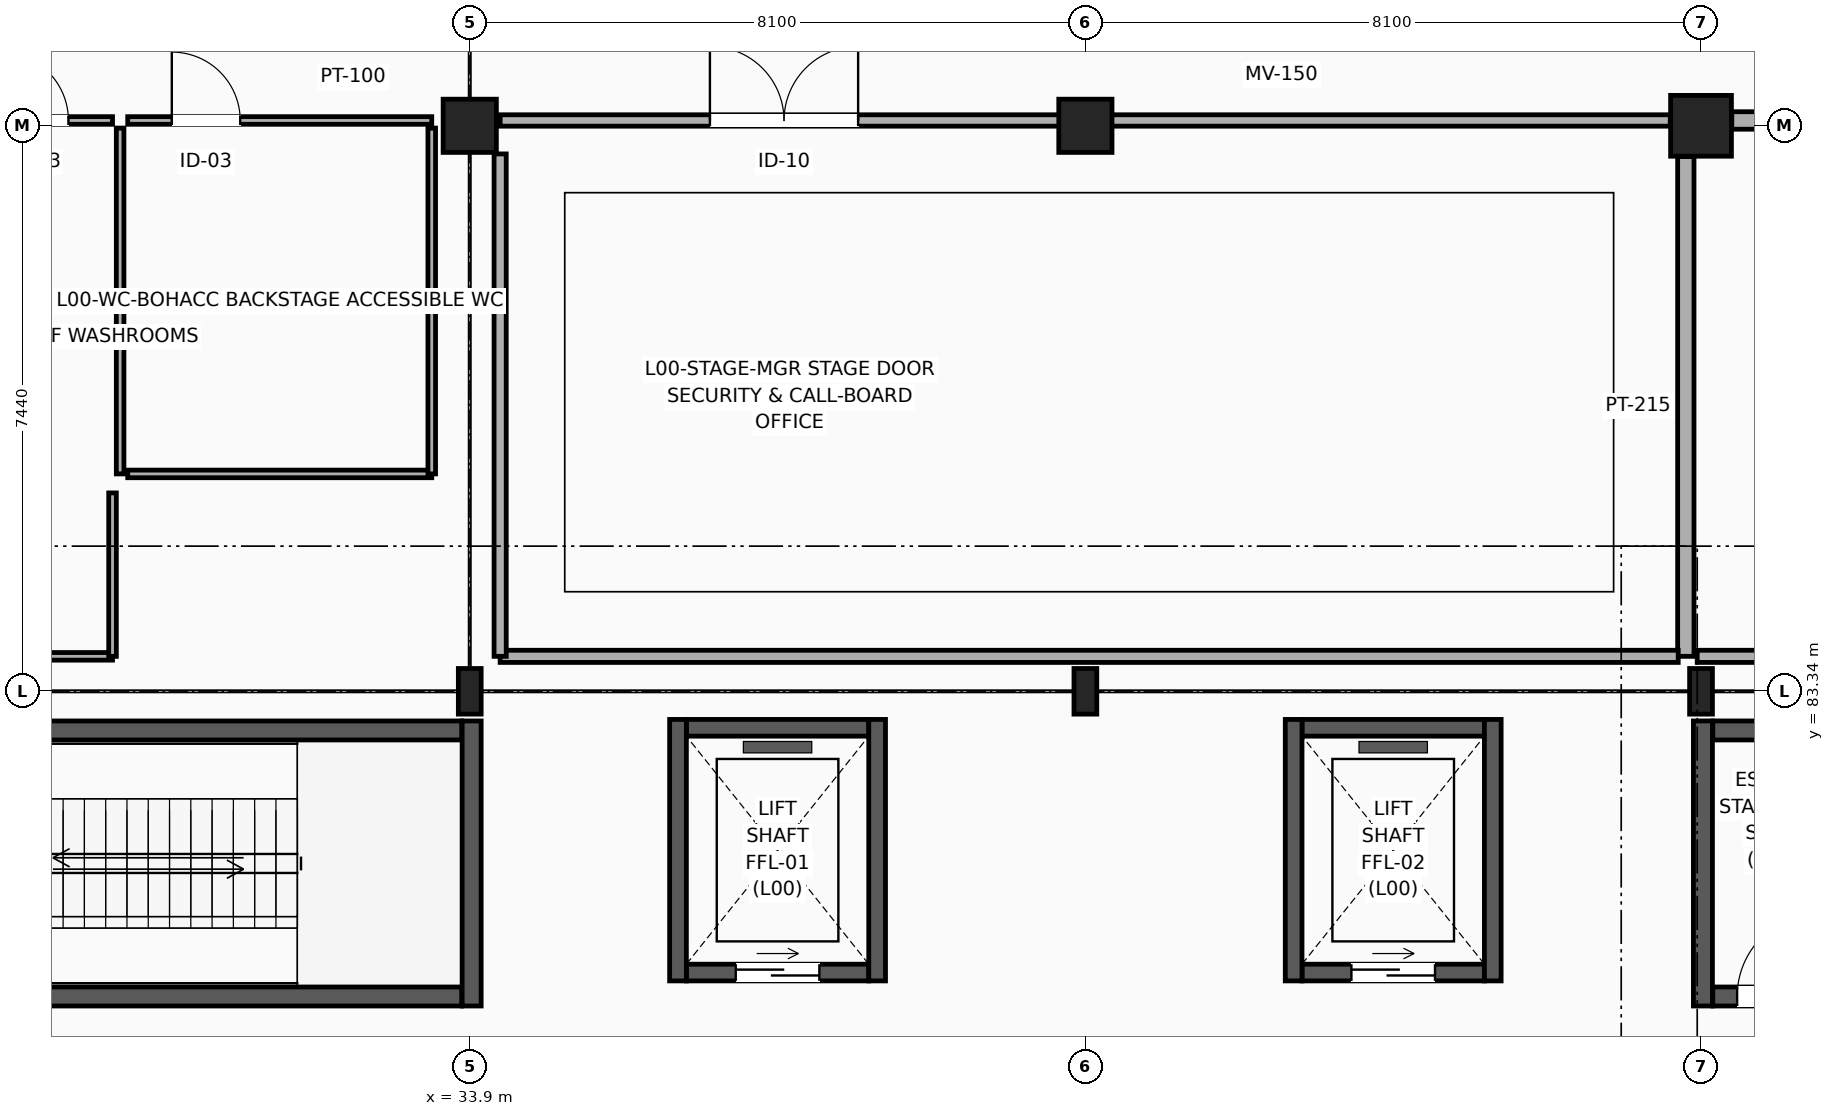
"""IFC4 building model, lengths in metres.
Left out: names, types, materials, properties, quantities, classifications, styles, units other than length and angle.
Written with IfcOpenShell. Run it as: python <this file> out.ifc"""

import sys

from ifc_helpers import new_model, si_unit, direction, frame, frame_2d, origin, origin_2d, place, context, subcontext, project, spatial, rectangle, i_section, extrude, element, fill, save


model = new_model("IFC4")
c1 = context("Model", 3, precision=1e-05, world=origin(), true_north=direction((0.0, 1.0)))
c2 = subcontext(c1, "Body", "Model", "MODEL_VIEW")
j1 = project(units=[si_unit("LENGTHUNIT", "METRE"), si_unit("PLANEANGLEUNIT", "RADIAN")], contexts=[c1])
p1 = place(None, origin())
s1 = spatial("IfcSite", under=j1, at=p1, CompositionType="ELEMENT")
p2 = place(p1, origin())
s2 = spatial("IfcBuilding", under=s1, at=p2, CompositionType="ELEMENT")
p3 = place(p2, origin())
s3 = spatial("IfcBuildingStorey", under=s2, at=p3, CompositionType="ELEMENT", Elevation=0.0)
p4 = place(p3, frame((33.9, 83.34, 0.0), z_axis=(0.0, 0.0, 1.0), x_axis=(1.0, 0.0, 0.0)))
e1 = element("IfcColumn", 1, at=p4, inside=s3, PredefinedType="COLUMN", context=c2, shape_type="SweptSolid", body=[
    extrude(i_section(OverallWidth=0.3, OverallDepth=0.6, WebThickness=0.015, FlangeThickness=0.03, FilletRadius=0.027, at=origin_2d()), origin(), (0.0, 0.0, 1.0), 5.4),
])
p5 = place(p3, frame((33.9, 90.78, 0.0), z_axis=(0.0, 0.0, 1.0), x_axis=(1.0, 0.0, 0.0)))
e2 = element("IfcColumn", 2, at=p5, inside=s3, PredefinedType="COLUMN", context=c2, shape_type="SweptSolid", body=[
    extrude(rectangle(XDim=0.7, YDim=0.7, at=origin_2d()), origin(), (0.0, 0.0, 1.0), 5.4),
])
p6 = place(p3, frame((42.0, 83.34, 0.0), z_axis=(0.0, 0.0, 1.0), x_axis=(1.0, 0.0, 0.0)))
e3 = element("IfcColumn", 3, at=p6, inside=s3, PredefinedType="COLUMN", context=c2, shape_type="SweptSolid", body=[
    extrude(i_section(OverallWidth=0.3, OverallDepth=0.6, WebThickness=0.015, FlangeThickness=0.03, FilletRadius=0.027, at=origin_2d()), origin(), (0.0, 0.0, 1.0), 5.4),
])
p7 = place(p3, frame((42.0, 90.78, 0.0), z_axis=(0.0, 0.0, 1.0), x_axis=(1.0, 0.0, 0.0)))
e4 = element("IfcColumn", 4, at=p7, inside=s3, PredefinedType="COLUMN", context=c2, shape_type="SweptSolid", body=[
    extrude(rectangle(XDim=0.7, YDim=0.7, at=origin_2d()), origin(), (0.0, 0.0, 1.0), 5.4),
])
p8 = place(p3, frame((50.1, 83.34, 0.0), z_axis=(0.0, 0.0, 1.0), x_axis=(1.0, 0.0, 0.0)))
e5 = element("IfcColumn", 5, at=p8, inside=s3, PredefinedType="COLUMN", context=c2, shape_type="SweptSolid", body=[
    extrude(i_section(OverallWidth=0.3, OverallDepth=0.6, WebThickness=0.015, FlangeThickness=0.03, FilletRadius=0.027, at=origin_2d()), origin(), (0.0, 0.0, 1.0), 5.4),
])
p9 = place(p3, frame((50.1, 90.78, 0.0), z_axis=(0.0, 0.0, 1.0), x_axis=(1.0, 0.0, 0.0)))
e6 = element("IfcColumn", 6, at=p9, inside=s3, PredefinedType="COLUMN", context=c2, shape_type="SweptSolid", body=[
    extrude(rectangle(XDim=0.8, YDim=0.8, at=origin_2d()), origin(), (0.0, 0.0, 1.0), 5.4),
])
p10 = place(p3, frame((26.155, 79.325, 0.0), z_axis=(0.0, 0.0, 1.0), x_axis=(1.0, 0.0, 0.0)))
e7 = element("IfcWall", 7, at=p10, inside=s3, PredefinedType="SHEAR", context=c2, shape_type="SweptSolid", body=[
    extrude(rectangle(XDim=7.64, YDim=0.25, at=frame_2d((3.82, 0.0))), origin(), (0.0, 0.0, 1.0), 5.105),
])
p11 = place(p10, frame((0.32, 0.0, 0.0)))
e8 = element("IfcOpeningElement", 8, at=p11, cuts=e7, PredefinedType="OPENING", context=c2, shape_type="SweptSolid", body=[
    extrude(rectangle(XDim=1.1, YDim=2.2, at=frame_2d((0.55, 1.1))), frame((0.0, 0.135, 0.0), z_axis=(0.0, -1.0, 0.0), x_axis=(1.0, 0.0, 0.0)), (0.0, 0.0, 1.0), 0.27),
])
p12 = place(p3, frame((26.155, 82.825, 0.0), z_axis=(0.0, 0.0, 1.0), x_axis=(1.0, 0.0, 0.0)))
e9 = element("IfcWall", 9, at=p12, inside=s3, PredefinedType="SHEAR", context=c2, shape_type="SweptSolid", body=[
    extrude(rectangle(XDim=7.64, YDim=0.25, at=frame_2d((3.82, 0.0))), origin(), (0.0, 0.0, 1.0), 5.105),
])
p13 = place(p3, frame((33.925, 79.2, 0.0), z_axis=(0.0, 0.0, 1.0), x_axis=(0.0, 1.0, 0.0)))
e10 = element("IfcWall", 10, at=p13, inside=s3, PredefinedType="SHEAR", context=c2, shape_type="SweptSolid", body=[
    extrude(rectangle(XDim=3.75, YDim=0.25, at=frame_2d((1.875, 0.0))), origin(), (0.0, 0.0, 1.0), 5.105),
])
p14 = place(p3, frame((50.255, 79.325, 0.0), z_axis=(0.0, 0.0, 1.0), x_axis=(1.0, 0.0, 0.0)))
e11 = element("IfcWall", 11, at=p14, inside=s3, PredefinedType="SHEAR", context=c2, shape_type="SweptSolid", body=[
    extrude(rectangle(XDim=7.64, YDim=0.25, at=frame_2d((3.82, 0.0))), origin(), (0.0, 0.0, 1.0), 5.105),
])
p15 = place(p14, frame((0.32, 0.0, 0.0)))
e12 = element("IfcOpeningElement", 12, at=p15, cuts=e11, PredefinedType="OPENING", context=c2, shape_type="SweptSolid", body=[
    extrude(rectangle(XDim=1.1, YDim=2.2, at=frame_2d((0.55, 1.1))), frame((0.0, 0.135, 0.0), z_axis=(0.0, -1.0, 0.0), x_axis=(1.0, 0.0, 0.0)), (0.0, 0.0, 1.0), 0.27),
])
p16 = place(p3, frame((50.255, 82.825, 0.0), z_axis=(0.0, 0.0, 1.0), x_axis=(1.0, 0.0, 0.0)))
e13 = element("IfcWall", 13, at=p16, inside=s3, PredefinedType="SHEAR", context=c2, shape_type="SweptSolid", body=[
    extrude(rectangle(XDim=7.64, YDim=0.25, at=frame_2d((3.82, 0.0))), origin(), (0.0, 0.0, 1.0), 5.105),
])
p17 = place(p3, frame((50.125, 79.2, 0.0), z_axis=(0.0, 0.0, 1.0), x_axis=(0.0, 1.0, 0.0)))
e14 = element("IfcWall", 14, at=p17, inside=s3, PredefinedType="SHEAR", context=c2, shape_type="SweptSolid", body=[
    extrude(rectangle(XDim=3.75, YDim=0.25, at=frame_2d((1.875, 0.0))), origin(), (0.0, 0.0, 1.0), 5.105),
])
p18 = place(p3, frame((36.75, 79.64, 0.0), z_axis=(0.0, 0.0, 1.0), x_axis=(1.0, 0.0, 0.0)))
e15 = element("IfcWall", 15, at=p18, inside=s3, PredefinedType="SOLIDWALL", context=c2, shape_type="SweptSolid", body=[
    extrude(rectangle(XDim=2.4, YDim=0.22, at=frame_2d((1.2, 0.0))), origin(), (0.0, 0.0, 1.0), 5.105),
])
p19 = place(p18, frame((0.65, 0.0, 0.0)))
e16 = element("IfcOpeningElement", 16, at=p19, cuts=e15, PredefinedType="OPENING", context=c2, shape_type="SweptSolid", body=[
    extrude(rectangle(XDim=1.1, YDim=2.2, at=frame_2d((0.55, 1.1))), frame((0.0, 0.12, 0.0), z_axis=(0.0, -1.0, 0.0), x_axis=(1.0, 0.0, 0.0)), (0.0, 0.0, 1.0), 0.24),
])
p20 = place(p3, frame((36.75, 82.86, 0.0), z_axis=(0.0, 0.0, 1.0), x_axis=(1.0, 0.0, 0.0)))
e17 = element("IfcWall", 17, at=p20, inside=s3, PredefinedType="SOLIDWALL", context=c2, shape_type="SweptSolid", body=[
    extrude(rectangle(XDim=2.4, YDim=0.22, at=frame_2d((1.2, 0.0))), origin(), (0.0, 0.0, 1.0), 5.105),
])
for number, where, z_axis, x_axis in (
    (18, (36.64, 79.53, 0.0), (0.0, 0.0, 1.0), (0.0, 1.0, 0.0)),
    (19, (39.26, 79.53, 0.0), (0.0, 0.0, 1.0), (0.0, 1.0, 0.0)),
):
    element("IfcWall", number, at=place(p3, frame(where, z_axis=z_axis, x_axis=x_axis)), inside=s3, PredefinedType="SOLIDWALL", context=c2, shape_type="SweptSolid", body=[
        extrude(rectangle(XDim=3.44, YDim=0.22, at=frame_2d((1.72, 0.0))), origin(), (0.0, 0.0, 1.0), 5.105),
    ])
p21 = place(p3, frame((44.85, 79.64, 0.0), z_axis=(0.0, 0.0, 1.0), x_axis=(1.0, 0.0, 0.0)))
e20 = element("IfcWall", 20, at=p21, inside=s3, PredefinedType="SOLIDWALL", context=c2, shape_type="SweptSolid", body=[
    extrude(rectangle(XDim=2.4, YDim=0.22, at=frame_2d((1.2, 0.0))), origin(), (0.0, 0.0, 1.0), 5.105),
])
p22 = place(p21, frame((0.65, 0.0, 0.0)))
e21 = element("IfcOpeningElement", 21, at=p22, cuts=e20, PredefinedType="OPENING", context=c2, shape_type="SweptSolid", body=[
    extrude(rectangle(XDim=1.1, YDim=2.2, at=frame_2d((0.55, 1.1))), frame((0.0, 0.12, 0.0), z_axis=(0.0, -1.0, 0.0), x_axis=(1.0, 0.0, 0.0)), (0.0, 0.0, 1.0), 0.24),
])
p23 = place(p3, frame((44.85, 82.86, 0.0), z_axis=(0.0, 0.0, 1.0), x_axis=(1.0, 0.0, 0.0)))
e22 = element("IfcWall", 22, at=p23, inside=s3, PredefinedType="SOLIDWALL", context=c2, shape_type="SweptSolid", body=[
    extrude(rectangle(XDim=2.4, YDim=0.22, at=frame_2d((1.2, 0.0))), origin(), (0.0, 0.0, 1.0), 5.105),
])
for number, where, z_axis, x_axis in (
    (23, (44.74, 79.53, 0.0), (0.0, 0.0, 1.0), (0.0, 1.0, 0.0)),
    (24, (47.36, 79.53, 0.0), (0.0, 0.0, 1.0), (0.0, 1.0, 0.0)),
):
    element("IfcWall", number, at=place(p3, frame(where, z_axis=z_axis, x_axis=x_axis)), inside=s3, PredefinedType="SOLIDWALL", context=c2, shape_type="SweptSolid", body=[
        extrude(rectangle(XDim=3.44, YDim=0.22, at=frame_2d((1.72, 0.0))), origin(), (0.0, 0.0, 1.0), 5.105),
    ])
p24 = place(p3, frame((26.205, 90.85, 0.0), z_axis=(0.0, 0.0, 1.0), x_axis=(1.0, 0.0, 0.0)))
e25 = element("IfcWall", 25, at=p24, inside=s3, PredefinedType="PARTITIONING", context=c2, shape_type="SweptSolid", body=[
    extrude(rectangle(XDim=2.995, YDim=0.1, at=frame_2d((1.498, 0.0))), origin(), (0.0, 0.0, 1.0), 4.137),
])
p25 = place(p24, frame((1.515, 0.0, 0.0)))
e26 = element("IfcOpeningElement", 26, at=p25, cuts=e25, PredefinedType="OPENING", context=c2, shape_type="SweptSolid", body=[
    extrude(rectangle(XDim=0.9, YDim=2.1, at=frame_2d((0.45, 1.05))), frame((0.0, 0.06, 0.0), z_axis=(0.0, -1.0, 0.0), x_axis=(1.0, 0.0, 0.0)), (0.0, 0.0, 1.0), 0.12),
])
p26 = place(p3, frame((29.4, 90.85, 0.0), z_axis=(0.0, 0.0, 1.0), x_axis=(1.0, 0.0, 0.0)))
e27 = element("IfcWall", 27, at=p26, inside=s3, PredefinedType="PARTITIONING", context=c2, shape_type="SweptSolid", body=[
    extrude(rectangle(XDim=4.0, YDim=0.1, at=frame_2d((2.0, 0.0))), origin(), (0.0, 0.0, 1.0), 4.137),
])
p27 = place(p26, frame((0.58, 0.0, 0.0)))
e28 = element("IfcOpeningElement", 28, at=p27, cuts=e27, PredefinedType="OPENING", context=c2, shape_type="SweptSolid", body=[
    extrude(rectangle(XDim=0.9, YDim=2.1, at=frame_2d((0.45, 1.05))), frame((0.0, 0.06, 0.0), z_axis=(0.0, -1.0, 0.0), x_axis=(1.0, 0.0, 0.0)), (0.0, 0.0, 1.0), 0.12),
])
p28 = place(p3, frame((34.3, 90.85, 0.0), z_axis=(0.0, 0.0, 1.0), x_axis=(1.0, 0.0, 0.0)))
e29 = element("IfcWall", 29, at=p28, inside=s3, PredefinedType="MOVABLE", context=c2, shape_type="SweptSolid", body=[
    extrude(rectangle(XDim=15.395, YDim=0.15, at=frame_2d((7.698, 0.0))), origin(), (0.0, 0.0, 1.0), 4.137),
])
p29 = place(p28, frame((2.76, 0.0, 0.0)))
e30 = element("IfcOpeningElement", 30, at=p29, cuts=e29, PredefinedType="OPENING", context=c2, shape_type="SweptSolid", body=[
    extrude(rectangle(XDim=1.95, YDim=2.45, at=frame_2d((0.975, 1.225))), frame((0.0, 0.085, 0.0), z_axis=(0.0, -1.0, 0.0), x_axis=(1.0, 0.0, 0.0)), (0.0, 0.0, 1.0), 0.17),
])
p30 = place(p3, frame((50.505, 90.85, 0.0), z_axis=(0.0, 0.0, 1.0), x_axis=(1.0, 0.0, 0.0)))
e31 = element("IfcWall", 31, at=p30, inside=s3, PredefinedType="SOLIDWALL", context=c2, shape_type="SweptSolid", body=[
    extrude(rectangle(XDim=15.295, YDim=0.23, at=frame_2d((7.647, 0.0))), origin(), (0.0, 0.0, 1.0), 4.137),
])
p31 = place(p30, frame((10.525, 0.0, 0.0)))
e32 = element("IfcOpeningElement", 32, at=p31, cuts=e31, PredefinedType="OPENING", context=c2, shape_type="SweptSolid", body=[
    extrude(rectangle(XDim=2.4, YDim=2.8, at=frame_2d((1.2, 1.4))), frame((0.0, 0.125, 0.0), z_axis=(0.0, -1.0, 0.0), x_axis=(1.0, 0.0, 0.0)), (0.0, 0.0, 1.0), 0.25),
])
p32 = place(p3, frame((29.3, 86.2, 0.0), z_axis=(0.0, 0.0, 1.0), x_axis=(0.0, 1.0, 0.0)))
e33 = element("IfcWall", 33, at=p32, inside=s3, PredefinedType="PARTITIONING", context=c2, shape_type="SweptSolid", body=[
    extrude(rectangle(XDim=4.55, YDim=0.1, at=frame_2d((2.275, 0.0))), origin(), (0.0, 0.0, 1.0), 4.137),
])
p33 = place(p3, frame((49.9, 83.8, 0.0), z_axis=(0.0, 0.0, 1.0), x_axis=(0.0, 1.0, 0.0)))
e34 = element("IfcWall", 34, at=p33, inside=s3, PredefinedType="PARTITIONING", context=c2, shape_type="SweptSolid", body=[
    extrude(rectangle(XDim=6.575, YDim=0.215, at=frame_2d((3.288, 0.0))), origin(), (0.0, 0.0, 1.0), 4.337),
])
p34 = place(p3, frame((25.65, 83.8, 0.0), z_axis=(0.0, 0.0, 1.0), x_axis=(1.0, 0.0, 0.0)))
e35 = element("IfcWall", 35, at=p34, inside=s3, PredefinedType="PARTITIONING", context=c2, shape_type="SweptSolid", body=[
    extrude(rectangle(XDim=3.55, YDim=0.1, at=frame_2d((1.775, 0.0))), origin(), (0.0, 0.0, 1.0), 4.337),
])
p35 = place(p3, frame((29.2, 83.8, 0.0), z_axis=(0.0, 0.0, 1.0), x_axis=(0.0, 1.0, 0.0)))
e36 = element("IfcWall", 36, at=p35, inside=s3, PredefinedType="PARTITIONING", context=c2, shape_type="SweptSolid", body=[
    extrude(rectangle(XDim=2.15, YDim=0.1, at=frame_2d((1.075, 0.0))), origin(), (0.0, 0.0, 1.0), 5.085),
])
p36 = place(p3, frame((29.4, 86.2, 0.0), z_axis=(0.0, 0.0, 1.0), x_axis=(1.0, 0.0, 0.0)))
e37 = element("IfcWall", 37, at=p36, inside=s3, PredefinedType="PARTITIONING", context=c2, shape_type="SweptSolid", body=[
    extrude(rectangle(XDim=4.0, YDim=0.1, at=frame_2d((2.0, 0.0))), origin(), (0.0, 0.0, 1.0), 4.817),
])
p37 = place(p3, frame((33.4, 86.2, 0.0), z_axis=(0.0, 0.0, 1.0), x_axis=(0.0, 1.0, 0.0)))
e38 = element("IfcWall", 38, at=p37, inside=s3, PredefinedType="PARTITIONING", context=c2, shape_type="SweptSolid", body=[
    extrude(rectangle(XDim=4.55, YDim=0.1, at=frame_2d((2.275, 0.0))), origin(), (0.0, 0.0, 1.0), 4.137),
])
p38 = place(p3, frame((34.3, 83.8, 0.0), z_axis=(0.0, 0.0, 1.0), x_axis=(1.0, 0.0, 0.0)))
e39 = element("IfcWall", 39, at=p38, inside=s3, PredefinedType="PARTITIONING", context=c2, shape_type="SweptSolid", body=[
    extrude(rectangle(XDim=15.5, YDim=0.16, at=frame_2d((7.75, 0.0))), origin(), (0.0, 0.0, 1.0), 4.337),
])
p39 = place(p3, frame((34.3, 83.8, 0.0), z_axis=(0.0, 0.0, 1.0), x_axis=(0.0, 1.0, 0.0)))
e40 = element("IfcWall", 40, at=p39, inside=s3, PredefinedType="PARTITIONING", context=c2, shape_type="SweptSolid", body=[
    extrude(rectangle(XDim=6.61, YDim=0.16, at=frame_2d((3.305, 0.0))), origin(), (0.0, 0.0, 1.0), 5.085),
])
p40 = place(p3, frame((50.05, 83.8, 0.0), z_axis=(0.0, 0.0, 1.0), x_axis=(1.0, 0.0, 0.0)))
e41 = element("IfcWall", 41, at=p40, inside=s3, PredefinedType="PARTITIONING", context=c2, shape_type="SweptSolid", body=[
    extrude(rectangle(XDim=15.75, YDim=0.16, at=frame_2d((7.875, 0.0))), origin(), (0.0, 0.0, 1.0), 4.337),
])
p41 = place(p15, origin())
e42 = element("IfcDoor", 42, at=p41, inside=s3, OperationType="SINGLE_SWING_RIGHT", PredefinedType="DOOR", context=c2, shape_type="SweptSolid", body=[
    extrude(rectangle(XDim=1.1, YDim=2.2, at=frame_2d((0.55, 1.1))), frame((0.0, 0.025, 0.0), z_axis=(0.0, -1.0, 0.0), x_axis=(1.0, 0.0, 0.0)), (0.0, 0.0, 1.0), 0.05),
])
fill(e12, e42)
p42 = place(p19, origin())
e43 = element("IfcDoor", 43, at=p42, inside=s3, OperationType="SLIDING_TO_LEFT", PredefinedType="DOOR", context=c2, shape_type="SweptSolid", body=[
    extrude(rectangle(XDim=1.1, YDim=2.2, at=frame_2d((0.55, 1.1))), frame((0.0, 0.025, 0.0), z_axis=(0.0, -1.0, 0.0), x_axis=(1.0, 0.0, 0.0)), (0.0, 0.0, 1.0), 0.05),
])
fill(e16, e43)
p43 = place(p22, origin())
e44 = element("IfcDoor", 44, at=p43, inside=s3, OperationType="SLIDING_TO_LEFT", PredefinedType="DOOR", context=c2, shape_type="SweptSolid", body=[
    extrude(rectangle(XDim=1.1, YDim=2.2, at=frame_2d((0.55, 1.1))), frame((0.0, 0.025, 0.0), z_axis=(0.0, -1.0, 0.0), x_axis=(1.0, 0.0, 0.0)), (0.0, 0.0, 1.0), 0.05),
])
fill(e21, e44)
p44 = place(p25, origin())
e45 = element("IfcDoor", 45, at=p44, inside=s3, OperationType="SINGLE_SWING_LEFT", PredefinedType="DOOR", context=c2, shape_type="SweptSolid", body=[
    extrude(rectangle(XDim=0.9, YDim=2.1, at=frame_2d((0.45, 1.05))), frame((0.0, 0.025, 0.0), z_axis=(0.0, -1.0, 0.0), x_axis=(1.0, 0.0, 0.0)), (0.0, 0.0, 1.0), 0.05),
])
fill(e26, e45)
p45 = place(p27, origin())
e46 = element("IfcDoor", 46, at=p45, inside=s3, OperationType="SINGLE_SWING_LEFT", PredefinedType="DOOR", context=c2, shape_type="SweptSolid", body=[
    extrude(rectangle(XDim=0.9, YDim=2.1, at=frame_2d((0.45, 1.05))), frame((0.0, 0.025, 0.0), z_axis=(0.0, -1.0, 0.0), x_axis=(1.0, 0.0, 0.0)), (0.0, 0.0, 1.0), 0.05),
])
fill(e28, e46)
p46 = place(p29, origin())
e47 = element("IfcDoor", 47, at=p46, inside=s3, OperationType="DOUBLE_DOOR_SINGLE_SWING", PredefinedType="DOOR", context=c2, shape_type="SweptSolid", body=[
    extrude(rectangle(XDim=1.95, YDim=2.45, at=frame_2d((0.975, 1.225))), frame((0.0, 0.025, 0.0), z_axis=(0.0, -1.0, 0.0), x_axis=(1.0, 0.0, 0.0)), (0.0, 0.0, 1.0), 0.05),
])
fill(e30, e47)
save(model, sys.argv[1])
